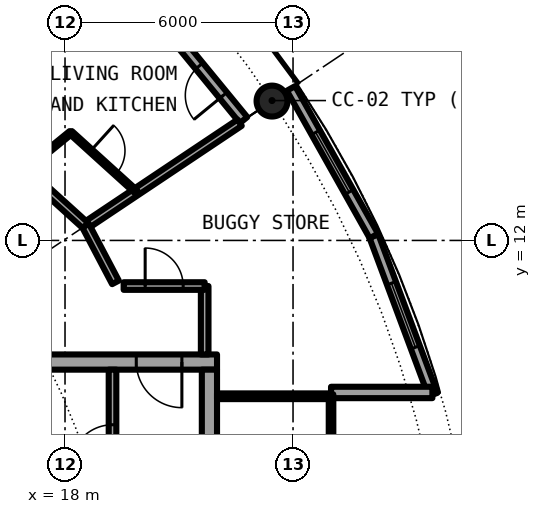
"""IFC4 building model, lengths in metres.
Left out: names, types, materials, properties, quantities, classifications, styles, units other than length and angle.
Written with IfcOpenShell. Run it as: python <this file> out.ifc"""

import sys

from ifc_helpers import new_model, si_unit, direction, frame, frame_2d, origin, origin_2d, place, context, subcontext, project, spatial, rectangle, hollow_circle, extrude, element, fill, save


model = new_model("IFC4")
c1 = context("Model", 3, precision=1e-05, world=origin(), true_north=direction((0.0, 1.0)))
c2 = subcontext(c1, "Body", "Model", "MODEL_VIEW")
j1 = project(units=[si_unit("LENGTHUNIT", "METRE"), si_unit("PLANEANGLEUNIT", "RADIAN")], contexts=[c1])
p1 = place(None, origin())
s1 = spatial("IfcSite", under=j1, at=p1, CompositionType="ELEMENT")
p2 = place(p1, origin())
s2 = spatial("IfcBuilding", under=s1, at=p2, CompositionType="ELEMENT")
p3 = place(p2, frame((0.0, 0.0, 227.95)))
s3 = spatial("IfcBuildingStorey", under=s2, at=p3, CompositionType="ELEMENT", Elevation=227.95)
p4 = place(p3, frame((23.448, 15.667, 0.0), z_axis=(0.0, 0.0, 1.0), x_axis=(1.0, 0.0, 0.0)))
e1 = element("IfcColumn", 1, at=p4, inside=s3, PredefinedType="COLUMN", context=c2, shape_type="SweptSolid", body=[
    extrude(hollow_circle(Radius=0.406, WallThickness=0.03, at=origin_2d()), origin(), (0.0, 0.0, 1.0), 3.05),
])
p5 = place(p3, frame((22.699, 15.167, 0.0), z_axis=(0.0, 0.0, 1.0), x_axis=(-0.634382322723, 0.773019449054, 0.0)))
e2 = element("IfcWall", 2, at=p5, inside=s3, PredefinedType="SOLIDWALL", context=c2, shape_type="SweptSolid", body=[
    extrude(rectangle(XDim=5.352, YDim=0.25, at=frame_2d((2.676, 0.0))), origin(), (0.0, 0.0, 1.0), 2.7),
])
p6 = place(p5, frame((0.841, 0.0, 0.0)))
e3 = element("IfcOpeningElement", 3, at=p6, cuts=e2, PredefinedType="OPENING", context=c2, shape_type="SweptSolid", body=[
    extrude(rectangle(XDim=1.0, YDim=2.2, at=frame_2d((0.5, 1.1))), frame((0.0, 0.135, 0.0), z_axis=(0.0, -1.0, 0.0), x_axis=(1.0, 0.0, 0.0)), (0.0, 0.0, 1.0), 0.27),
])
p7 = place(p5, frame((3.111, 0.0, 0.3)))
e4 = element("IfcOpeningElement", 4, at=p7, cuts=e2, PredefinedType="OPENING", context=c2, shape_type="SweptSolid", body=[
    extrude(rectangle(XDim=1.8, YDim=2.1, at=frame_2d((0.9, 1.05))), frame((0.0, 0.135, 0.0), z_axis=(0.0, -1.0, 0.0), x_axis=(1.0, 0.0, 0.0)), (0.0, 0.0, 1.0), 0.27),
])
p8 = place(p3, frame((27.682, 7.945, 0.0), z_axis=(0.0, 0.0, 1.0), x_axis=(-0.349247811493, 0.937030397675, 0.0)))
e5 = element("IfcWall", 5, at=p8, inside=s3, PredefinedType="SOLIDWALL", context=c2, shape_type="SweptSolid", body=[
    extrude(rectangle(XDim=4.452, YDim=0.25, at=frame_2d((2.226, 0.0))), origin(), (0.0, 0.0, 1.0), 2.7),
])
p9 = place(p8, frame((1.327, 0.0, 0.3)))
e6 = element("IfcOpeningElement", 6, at=p9, cuts=e5, PredefinedType="OPENING", context=c2, shape_type="SweptSolid", body=[
    extrude(rectangle(XDim=1.8, YDim=2.1, at=frame_2d((0.9, 1.05))), frame((0.0, 0.135, 0.0), z_axis=(0.0, -1.0, 0.0), x_axis=(1.0, 0.0, 0.0)), (0.0, 0.0, 1.0), 0.27),
])
p10 = place(p3, frame((26.127, 12.117, 0.0), z_axis=(0.0, 0.0, 1.0), x_axis=(-0.489696356642, 0.871893042919, 0.0)))
e7 = element("IfcWall", 7, at=p10, inside=s3, PredefinedType="SOLIDWALL", context=c2, shape_type="SweptSolid", body=[
    extrude(rectangle(XDim=4.454, YDim=0.25, at=frame_2d((2.227, 0.0))), origin(), (0.0, 0.0, 1.0), 2.7),
])
p11 = place(p10, frame((1.327, 0.0, 0.3)))
e8 = element("IfcOpeningElement", 8, at=p11, cuts=e7, PredefinedType="OPENING", context=c2, shape_type="SweptSolid", body=[
    extrude(rectangle(XDim=1.8, YDim=2.1, at=frame_2d((0.9, 1.05))), frame((0.0, 0.135, 0.0), z_axis=(0.0, -1.0, 0.0), x_axis=(1.0, 0.0, 0.0)), (0.0, 0.0, 1.0), 0.27),
])
p12 = place(p3, frame((25.0, 8.0, 0.0), z_axis=(0.0, 0.0, 1.0), x_axis=(1.0, 0.0, 0.0)))
e9 = element("IfcWall", 9, at=p12, inside=s3, PredefinedType="SOLIDWALL", context=c2, shape_type="SweptSolid", body=[
    extrude(rectangle(XDim=2.667, YDim=0.3, at=frame_2d((1.333, 0.0))), origin(), (0.0, 0.0, 1.0), 2.7),
])
p13 = place(p3, frame((22.0, 8.8, 0.0), z_axis=(0.0, 0.0, 1.0), x_axis=(-1.0, 0.0, 0.0)))
e10 = element("IfcWall", 10, at=p13, inside=s3, PredefinedType="SHEAR", context=c2, shape_type="SweptSolid", body=[
    extrude(rectangle(XDim=13.4, YDim=0.4, at=frame_2d((6.7, 0.0))), origin(), (0.0, 0.0, 1.0), 3.05),
])
p14 = place(p13, frame((0.925, 0.0, 0.0)))
e11 = element("IfcOpeningElement", 11, at=p14, cuts=e10, PredefinedType="OPENING", context=c2, shape_type="SweptSolid", body=[
    extrude(rectangle(XDim=1.2, YDim=2.3, at=frame_2d((0.6, 1.15))), frame((0.0, 0.21, 0.0), z_axis=(0.0, -1.0, 0.0), x_axis=(1.0, 0.0, 0.0)), (0.0, 0.0, 1.0), 0.42),
])
p15 = place(p3, frame((21.8, 8.6, 0.0), z_axis=(0.0, 0.0, 1.0), x_axis=(0.0, -1.0, 0.0)))
e12 = element("IfcWall", 12, at=p15, inside=s3, PredefinedType="SHEAR", context=c2, shape_type="SweptSolid", body=[
    extrude(rectangle(XDim=17.2, YDim=0.4, at=frame_2d((8.6, 0.0))), origin(), (0.0, 0.0, 1.0), 3.05),
])
p16 = place(p15, frame((7.7, 0.0, 0.0)))
e13 = element("IfcOpeningElement", 13, at=p16, cuts=e12, PredefinedType="OPENING", context=c2, shape_type="SweptSolid", body=[
    extrude(rectangle(XDim=1.8, YDim=2.3, at=frame_2d((0.9, 1.15))), frame((0.0, 0.21, 0.0), z_axis=(0.0, -1.0, 0.0), x_axis=(1.0, 0.0, 0.0)), (0.0, 0.0, 1.0), 0.42),
])
p17 = place(p3, frame((19.25, 1.575, 0.0), z_axis=(0.0, 0.0, 1.0), x_axis=(0.0, 1.0, 0.0)))
e14 = element("IfcWall", 14, at=p17, inside=s3, PredefinedType="SOLIDWALL", context=c2, shape_type="SweptSolid", body=[
    extrude(rectangle(XDim=7.025, YDim=0.2, at=frame_2d((3.513, 0.0))), origin(), (0.0, 0.0, 1.0), 2.7),
])
p18 = place(p17, frame((4.475, 0.0, 0.0)))
e15 = element("IfcOpeningElement", 15, at=p18, cuts=e14, PredefinedType="OPENING", context=c2, shape_type="SweptSolid", body=[
    extrude(rectangle(XDim=1.1, YDim=2.3, at=frame_2d((0.55, 1.15))), frame((0.0, 0.11, 0.0), z_axis=(0.0, -1.0, 0.0), x_axis=(1.0, 0.0, 0.0)), (0.0, 0.0, 1.0), 0.22),
])
p19 = place(p3, frame((22.0, 7.9, 0.0), z_axis=(0.0, 0.0, 1.0), x_axis=(1.0, 0.0, 0.0)))
e16 = element("IfcWall", 16, at=p19, inside=s3, PredefinedType="PARTITIONING", context=c2, shape_type="SweptSolid", body=[
    extrude(rectangle(XDim=2.94, YDim=0.15, at=frame_2d((1.47, 0.0))), origin(), (0.0, 0.0, 1.0), 2.7),
])
p20 = place(p3, frame((25.0, 7.95, 0.0), z_axis=(0.0, 0.0, 1.0), x_axis=(0.0, -1.0, 0.0)))
e17 = element("IfcWall", 17, at=p20, inside=s3, PredefinedType="PARTITIONING", context=c2, shape_type="SweptSolid", body=[
    extrude(rectangle(XDim=15.9, YDim=0.12, at=frame_2d((7.95, 0.0))), origin(), (0.0, 0.0, 1.0), 2.7),
])
p21 = place(p20, frame((6.75, 0.0, 0.0)))
e18 = element("IfcOpeningElement", 18, at=p21, cuts=e17, PredefinedType="OPENING", context=c2, shape_type="SweptSolid", body=[
    extrude(rectangle(XDim=2.4, YDim=2.3, at=frame_2d((1.2, 1.15))), frame((0.0, 0.07, 0.0), z_axis=(0.0, -1.0, 0.0), x_axis=(1.0, 0.0, 0.0)), (0.0, 0.0, 1.0), 0.14),
])
p22 = place(p20, frame((11.55, 0.0, 0.1)))
e19 = element("IfcOpeningElement", 19, at=p22, cuts=e17, PredefinedType="OPENING", context=c2, shape_type="SweptSolid", body=[
    extrude(rectangle(XDim=3.4, YDim=2.35, at=frame_2d((1.7, 1.175))), frame((0.0, 0.07, 0.0), z_axis=(0.0, -1.0, 0.0), x_axis=(1.0, 0.0, 0.0)), (0.0, 0.0, 1.0), 0.14),
])
p23 = place(p20, frame((0.95, 0.0, 0.1)))
e20 = element("IfcOpeningElement", 20, at=p23, cuts=e17, PredefinedType="OPENING", context=c2, shape_type="SweptSolid", body=[
    extrude(rectangle(XDim=3.4, YDim=2.35, at=frame_2d((1.7, 1.175))), frame((0.0, 0.07, 0.0), z_axis=(0.0, -1.0, 0.0), x_axis=(1.0, 0.0, 0.0)), (0.0, 0.0, 1.0), 0.14),
])
p24 = place(p3, frame((21.675, 9.0, 0.0), z_axis=(0.0, 0.0, 1.0), x_axis=(0.0, 1.0, 0.0)))
e21 = element("IfcWall", 21, at=p24, inside=s3, PredefinedType="PARTITIONING", context=c2, shape_type="SweptSolid", body=[
    extrude(rectangle(XDim=1.8, YDim=0.2, at=frame_2d((0.9, 0.0))), origin(), (0.0, 0.0, 1.0), 2.7),
])
p25 = place(p3, frame((16.43, 16.398, 0.0), z_axis=(0.0, 0.0, 1.0), x_axis=(0.707722727509, 0.706490297858, 0.0)))
e22 = element("IfcWall", 22, at=p25, inside=s3, PredefinedType="PARTITIONING", context=c2, shape_type="SweptSolid", body=[
    extrude(rectangle(XDim=3.962, YDim=0.1, at=frame_2d((1.981, 0.0))), origin(), (0.0, 0.0, 1.0), 2.7),
])
p26 = place(p25, frame((1.531, 0.0, 0.0)))
e23 = element("IfcOpeningElement", 23, at=p26, cuts=e22, PredefinedType="OPENING", context=c2, shape_type="SweptSolid", body=[
    extrude(rectangle(XDim=0.9, YDim=2.3, at=frame_2d((0.45, 1.15))), frame((0.0, 0.06, 0.0), z_axis=(0.0, -1.0, 0.0), x_axis=(1.0, 0.0, 0.0)), (0.0, 0.0, 1.0), 0.12),
])
p27 = place(p3, frame((16.936, 13.845, 0.0), z_axis=(0.0, 0.0, 1.0), x_axis=(0.774283039722, 0.632839453889, 0.0)))
e24 = element("IfcWall", 24, at=p27, inside=s3, PredefinedType="PARTITIONING", context=c2, shape_type="SweptSolid", body=[
    extrude(rectangle(XDim=1.569, YDim=0.1, at=frame_2d((0.785, 0.0))), origin(), (0.0, 0.0, 1.0), 2.7),
])
p28 = place(p3, frame((18.542, 12.389, 0.0), z_axis=(0.0, 0.0, 1.0), x_axis=(0.831387096605, 0.55569370664, 0.0)))
e25 = element("IfcWall", 25, at=p28, inside=s3, PredefinedType="PARTITIONING", context=c2, shape_type="SweptSolid", body=[
    extrude(rectangle(XDim=4.875, YDim=0.2, at=frame_2d((2.438, 0.0))), origin(), (0.0, 0.0, 1.0), 2.7),
])
p29 = place(p3, frame((19.543, 10.8, 0.0), z_axis=(0.0, 0.0, 1.0), x_axis=(1.0, 0.0, 0.0)))
e26 = element("IfcWall", 26, at=p29, inside=s3, PredefinedType="PARTITIONING", context=c2, shape_type="SweptSolid", body=[
    extrude(rectangle(XDim=2.132, YDim=0.2, at=frame_2d((1.066, 0.0))), origin(), (0.0, 0.0, 1.0), 2.7),
])
p30 = place(p29, frame((0.566, 0.0, 0.0)))
e27 = element("IfcOpeningElement", 27, at=p30, cuts=e26, PredefinedType="OPENING", context=c2, shape_type="SweptSolid", body=[
    extrude(rectangle(XDim=1.0, YDim=2.3, at=frame_2d((0.5, 1.15))), frame((0.0, 0.11, 0.0), z_axis=(0.0, -1.0, 0.0), x_axis=(1.0, 0.0, 0.0)), (0.0, 0.0, 1.0), 0.22),
])
p31 = place(p3, frame((10.512, 19.667, 0.0), z_axis=(0.0, 0.0, 1.0), x_axis=(0.740947367223, -0.671563101283, 0.0)))
e28 = element("IfcWall", 28, at=p31, inside=s3, PredefinedType="PARTITIONING", context=c2, shape_type="SweptSolid", body=[
    extrude(rectangle(XDim=10.837, YDim=0.2, at=frame_2d((5.419, 0.0))), origin(), (0.0, 0.0, 1.0), 2.7),
])
p32 = place(p31, frame((3.835, 0.0, 0.0)))
e29 = element("IfcOpeningElement", 29, at=p32, cuts=e28, PredefinedType="OPENING", context=c2, shape_type="SweptSolid", body=[
    extrude(rectangle(XDim=1.0, YDim=2.3, at=frame_2d((0.5, 1.15))), frame((0.0, 0.11, 0.0), z_axis=(0.0, -1.0, 0.0), x_axis=(1.0, 0.0, 0.0)), (0.0, 0.0, 1.0), 0.22),
])
p33 = place(p3, frame((18.542, 12.389, 0.0), z_axis=(0.0, 0.0, 1.0), x_axis=(0.465812036273, -0.88488369115, 0.0)))
e30 = element("IfcWall", 30, at=p33, inside=s3, PredefinedType="PARTITIONING", context=c2, shape_type="SweptSolid", body=[
    extrude(rectangle(XDim=1.687, YDim=0.2, at=frame_2d((0.844, 0.0))), origin(), (0.0, 0.0, 1.0), 2.7),
])
p34 = place(p3, frame((18.149, 14.84, 0.0), z_axis=(0.0, 0.0, 1.0), x_axis=(0.741127434804, -0.671364376014, 0.0)))
e31 = element("IfcWall", 31, at=p34, inside=s3, PredefinedType="PARTITIONING", context=c2, shape_type="SweptSolid", body=[
    extrude(rectangle(XDim=2.324, YDim=0.1, at=frame_2d((1.162, 0.0))), origin(), (0.0, 0.0, 1.0), 2.7),
])
p35 = place(p34, frame((0.714, 0.0, 0.0)))
e32 = element("IfcOpeningElement", 32, at=p35, cuts=e31, PredefinedType="OPENING", context=c2, shape_type="SweptSolid", body=[
    extrude(rectangle(XDim=0.9, YDim=2.3, at=frame_2d((0.45, 1.15))), frame((0.0, 0.06, 0.0), z_axis=(0.0, -1.0, 0.0), x_axis=(1.0, 0.0, 0.0)), (0.0, 0.0, 1.0), 0.12),
])
p36 = place(p6, origin())
e33 = element("IfcDoor", 33, at=p36, inside=s3, OperationType="SINGLE_SWING_LEFT", PredefinedType="DOOR", context=c2, shape_type="SweptSolid", body=[
    extrude(rectangle(XDim=1.0, YDim=2.2, at=frame_2d((0.5, 1.1))), frame((0.0, 0.025, 0.0), z_axis=(0.0, -1.0, 0.0), x_axis=(1.0, 0.0, 0.0)), (0.0, 0.0, 1.0), 0.05),
])
fill(e3, e33)
p37 = place(p9, origin())
e34 = element("IfcWindow", 34, at=p37, inside=s3, PartitioningType="SINGLE_PANEL", PredefinedType="WINDOW", context=c2, shape_type="SweptSolid", body=[
    extrude(rectangle(XDim=1.8, YDim=2.1, at=frame_2d((0.9, 1.05))), frame((0.0, 0.03, 0.0), z_axis=(0.0, -1.0, 0.0), x_axis=(1.0, 0.0, 0.0)), (0.0, 0.0, 1.0), 0.06),
])
fill(e6, e34)
p38 = place(p11, origin())
e35 = element("IfcWindow", 35, at=p38, inside=s3, PartitioningType="SINGLE_PANEL", PredefinedType="WINDOW", context=c2, shape_type="SweptSolid", body=[
    extrude(rectangle(XDim=1.8, YDim=2.1, at=frame_2d((0.9, 1.05))), frame((0.0, 0.03, 0.0), z_axis=(0.0, -1.0, 0.0), x_axis=(1.0, 0.0, 0.0)), (0.0, 0.0, 1.0), 0.06),
])
fill(e8, e35)
p39 = place(p18, origin())
e36 = element("IfcDoor", 36, at=p39, inside=s3, OperationType="SINGLE_SWING_LEFT", PredefinedType="DOOR", context=c2, shape_type="SweptSolid", body=[
    extrude(rectangle(XDim=1.1, YDim=2.3, at=frame_2d((0.55, 1.15))), frame((0.0, 0.025, 0.0), z_axis=(0.0, -1.0, 0.0), x_axis=(1.0, 0.0, 0.0)), (0.0, 0.0, 1.0), 0.05),
])
fill(e15, e36)
p40 = place(p14, origin())
e37 = element("IfcDoor", 37, at=p40, inside=s3, OperationType="SINGLE_SWING_RIGHT", PredefinedType="DOOR", context=c2, shape_type="SweptSolid", body=[
    extrude(rectangle(XDim=1.2, YDim=2.3, at=frame_2d((0.6, 1.15))), frame((0.0, 0.025, 0.0), z_axis=(0.0, -1.0, 0.0), x_axis=(1.0, 0.0, 0.0)), (0.0, 0.0, 1.0), 0.05),
])
fill(e11, e37)
p41 = place(p23, origin())
e38 = element("IfcWindow", 38, at=p41, inside=s3, PartitioningType="SINGLE_PANEL", PredefinedType="WINDOW", context=c2, shape_type="SweptSolid", body=[
    extrude(rectangle(XDim=3.4, YDim=2.35, at=frame_2d((1.7, 1.175))), frame((0.0, 0.03, 0.0), z_axis=(0.0, -1.0, 0.0), x_axis=(1.0, 0.0, 0.0)), (0.0, 0.0, 1.0), 0.06),
])
fill(e20, e38)
p42 = place(p35, origin())
e39 = element("IfcDoor", 39, at=p42, inside=s3, OperationType="SINGLE_SWING_RIGHT", PredefinedType="DOOR", context=c2, shape_type="SweptSolid", body=[
    extrude(rectangle(XDim=0.9, YDim=2.3, at=frame_2d((0.45, 1.15))), frame((0.0, 0.025, 0.0), z_axis=(0.0, -1.0, 0.0), x_axis=(1.0, 0.0, 0.0)), (0.0, 0.0, 1.0), 0.05),
])
fill(e32, e39)
p43 = place(p30, origin())
e40 = element("IfcDoor", 40, at=p43, inside=s3, OperationType="SINGLE_SWING_RIGHT", PredefinedType="DOOR", context=c2, shape_type="SweptSolid", body=[
    extrude(rectangle(XDim=1.0, YDim=2.3, at=frame_2d((0.5, 1.15))), frame((0.0, 0.025, 0.0), z_axis=(0.0, -1.0, 0.0), x_axis=(1.0, 0.0, 0.0)), (0.0, 0.0, 1.0), 0.05),
])
fill(e27, e40)
save(model, sys.argv[1])
